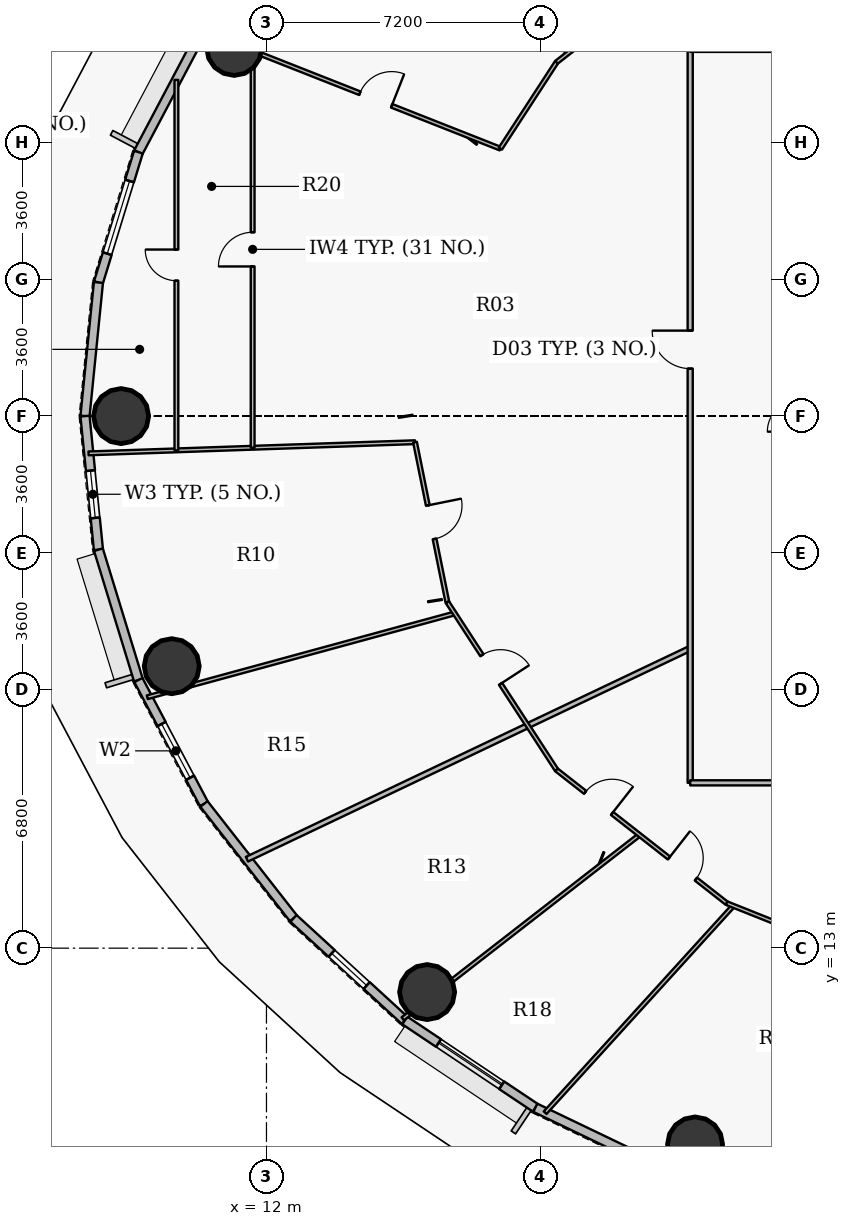
"""IFC4 building model, lengths in metres.
Left out: names, types, materials, properties, quantities, classifications, styles, units other than length and angle.
Written with IfcOpenShell. Run it as: python <this file> out.ifc"""

import sys

from ifc_helpers import new_model, si_unit, direction, frame, frame_2d, origin, origin_2d, place, context, subcontext, project, spatial, rectangle, hollow_circle, extrude, source, transform, mapped, element, fill, save


model = new_model("IFC4")
c1 = context("Model", 3, precision=1e-05, world=origin(), true_north=direction((0.0, 1.0)))
c2 = subcontext(c1, "Body", "Model", "MODEL_VIEW")
j1 = project(units=[si_unit("LENGTHUNIT", "METRE"), si_unit("PLANEANGLEUNIT", "RADIAN")], contexts=[c1])
p1 = place(None, origin())
s1 = spatial("IfcSite", under=j1, at=p1, CompositionType="ELEMENT")
p2 = place(p1, origin())
s2 = spatial("IfcBuilding", under=s1, at=p2, CompositionType="ELEMENT")
p3 = place(p2, frame((0.0, 0.0, 92.4)))
s3 = spatial("IfcBuildingStorey", under=s2, at=p3, CompositionType="ELEMENT", Elevation=92.4)
for number, where, z_axis, x_axis in (
    (1, (11.151, 36.688, -0.3), (0.0, 0.0, 1.0), (1.0, 0.0, 0.0)),
    (2, (8.175, 27.0, -0.3), (0.0, 0.0, 1.0), (1.0, 0.0, 0.0)),
    (3, (9.507, 20.419, -0.3), (0.0, 0.0, 1.0), (1.0, 0.0, 0.0)),
    (4, (16.227, 11.844, -0.3), (0.0, 0.0, 1.0), (1.0, 0.0, 0.0)),
    (5, (23.278, 7.835, -0.3), (0.0, 0.0, 1.0), (1.0, 0.0, 0.0)),
):
    element("IfcColumn", number, at=place(p3, frame(where, z_axis=z_axis, x_axis=x_axis)), inside=s3, PredefinedType="COLUMN", context=c2, shape_type="SweptSolid", body=[
        extrude(hollow_circle(Radius=0.725, WallThickness=0.042, at=origin_2d()), origin(), (0.0, 0.0, 1.0), 5.1),
    ])
p4 = place(p3, frame((8.63, 33.945, 0.0), z_axis=(0.0, 0.0, 1.0), x_axis=(0.467614004126, 0.883932770716, 0.0)))
e6 = element("IfcWall", 6, at=p4, inside=s3, PredefinedType="SOLIDWALL", context=c2, shape_type="SweptSolid", body=[
    extrude(rectangle(XDim=3.689, YDim=0.24, at=frame_2d((1.844, 0.0))), origin(), (0.0, 0.0, 1.0), 4.55),
])
p5 = place(p3, frame((7.578, 30.515, 0.0), z_axis=(0.0, 0.0, 1.0), x_axis=(0.293124431344, 0.956074300329, 0.0)))
e7 = element("IfcWall", 7, at=p5, inside=s3, PredefinedType="SOLIDWALL", context=c2, shape_type="SweptSolid", body=[
    extrude(rectangle(XDim=3.587, YDim=0.24, at=frame_2d((1.793, 0.0))), origin(), (0.0, 0.0, 1.0), 4.55),
])
p6 = place(p5, frame((0.794, 0.0, 0.9)))
e8 = element("IfcOpeningElement", 8, at=p6, cuts=e7, PredefinedType="OPENING", context=c2, shape_type="SweptSolid", body=[
    extrude(rectangle(XDim=2.0, YDim=1.75, at=origin_2d()), frame((1.0, 0.13, 0.875), z_axis=(0.0, -1.0, 0.0), x_axis=(1.0, 0.0, 0.0)), (0.0, 0.0, 1.0), 0.26),
])
p7 = place(p3, frame((7.225, 27.0, 0.0), z_axis=(0.0, 0.0, 1.0), x_axis=(0.099989468229, 0.994988495533, 0.0)))
e9 = element("IfcWall", 9, at=p7, inside=s3, PredefinedType="SOLIDWALL", context=c2, shape_type="SweptSolid", body=[
    extrude(rectangle(XDim=3.533, YDim=0.24, at=frame_2d((1.767, 0.0))), origin(), (0.0, 0.0, 1.0), 4.55),
])
p8 = place(p3, frame((7.578, 23.485, 0.0), z_axis=(0.0, 0.0, 1.0), x_axis=(-0.099989468229, 0.994988495533, 0.0)))
e10 = element("IfcWall", 10, at=p8, inside=s3, PredefinedType="SOLIDWALL", context=c2, shape_type="SweptSolid", body=[
    extrude(rectangle(XDim=3.533, YDim=0.24, at=frame_2d((1.767, 0.0))), origin(), (0.0, 0.0, 1.0), 4.55),
])
p9 = place(p8, frame((0.841, 0.0, 0.9)))
e11 = element("IfcOpeningElement", 11, at=p9, cuts=e10, PredefinedType="OPENING", context=c2, shape_type="SweptSolid", body=[
    extrude(rectangle(XDim=1.25, YDim=1.65, at=origin_2d()), frame((0.625, 0.13, 0.825), z_axis=(0.0, -1.0, 0.0), x_axis=(1.0, 0.0, 0.0)), (0.0, 0.0, 1.0), 0.26),
])
p10 = place(p3, frame((8.63, 20.055, 0.0), z_axis=(0.0, 0.0, 1.0), x_axis=(-0.293124431344, 0.956074300329, 0.0)))
e12 = element("IfcWall", 12, at=p10, inside=s3, PredefinedType="SOLIDWALL", context=c2, shape_type="SweptSolid", body=[
    extrude(rectangle(XDim=3.587, YDim=0.24, at=frame_2d((1.793, 0.0))), origin(), (0.0, 0.0, 1.0), 4.55),
])
p11 = place(p3, frame((10.355, 16.794, 0.0), z_axis=(0.0, 0.0, 1.0), x_axis=(-0.467614004126, 0.883932770716, 0.0)))
e13 = element("IfcWall", 13, at=p11, inside=s3, PredefinedType="SOLIDWALL", context=c2, shape_type="SweptSolid", body=[
    extrude(rectangle(XDim=3.689, YDim=0.24, at=frame_2d((1.844, 0.0))), origin(), (0.0, 0.0, 1.0), 4.55),
])
p12 = place(p11, frame((0.781, 0.0, 0.9)))
e14 = element("IfcOpeningElement", 14, at=p12, cuts=e13, PredefinedType="OPENING", context=c2, shape_type="SweptSolid", body=[
    extrude(rectangle(XDim=1.6, YDim=1.75, at=origin_2d()), frame((0.8, 0.13, 0.875), z_axis=(0.0, -1.0, 0.0), x_axis=(1.0, 0.0, 0.0)), (0.0, 0.0, 1.0), 0.26),
])
p13 = place(p3, frame((12.711, 13.783, 0.0), z_axis=(0.0, 0.0, 1.0), x_axis=(-0.616272103517, 0.787533297345, 0.0)))
e15 = element("IfcWall", 15, at=p13, inside=s3, PredefinedType="SOLIDWALL", context=c2, shape_type="SweptSolid", body=[
    extrude(rectangle(XDim=3.823, YDim=0.24, at=frame_2d((1.912, 0.0))), origin(), (0.0, 0.0, 1.0), 4.55),
])
p14 = place(p3, frame((15.642, 11.097, 0.0), z_axis=(0.0, 0.0, 1.0), x_axis=(-0.737113356241, 0.675769117414, 0.0)))
e16 = element("IfcWall", 16, at=p14, inside=s3, PredefinedType="SOLIDWALL", context=c2, shape_type="SweptSolid", body=[
    extrude(rectangle(XDim=3.976, YDim=0.24, at=frame_2d((1.988, 0.0))), origin(), (0.0, 0.0, 1.0), 4.55),
])
p15 = place(p14, frame((1.363, 0.0, 0.9)))
e17 = element("IfcOpeningElement", 17, at=p15, cuts=e16, PredefinedType="OPENING", context=c2, shape_type="SweptSolid", body=[
    extrude(rectangle(XDim=1.25, YDim=1.65, at=origin_2d()), frame((0.625, 0.13, 0.825), z_axis=(0.0, -1.0, 0.0), x_axis=(1.0, 0.0, 0.0)), (0.0, 0.0, 1.0), 0.26),
])
p16 = place(p3, frame((19.075, 8.801, 0.0), z_axis=(0.0, 0.0, 1.0), x_axis=(-0.831221811447, 0.555940914284, 0.0)))
e18 = element("IfcWall", 18, at=p16, inside=s3, PredefinedType="SOLIDWALL", context=c2, shape_type="SweptSolid", body=[
    extrude(rectangle(XDim=4.13, YDim=0.24, at=frame_2d((2.065, 0.0))), origin(), (0.0, 0.0, 1.0), 4.55),
])
p17 = place(p16, frame((1.065, 0.0, 0.9)))
e19 = element("IfcOpeningElement", 19, at=p17, cuts=e18, PredefinedType="OPENING", context=c2, shape_type="SweptSolid", body=[
    extrude(rectangle(XDim=2.0, YDim=1.75, at=origin_2d()), frame((1.0, 0.13, 0.875), z_axis=(0.0, -1.0, 0.0), x_axis=(1.0, 0.0, 0.0)), (0.0, 0.0, 1.0), 0.26),
])
p18 = place(p3, frame((22.926, 6.953, 0.0), z_axis=(0.0, 0.0, 1.0), x_axis=(-0.901589935876, 0.432591709962, 0.0)))
e20 = element("IfcWall", 20, at=p18, inside=s3, PredefinedType="SOLIDWALL", context=c2, shape_type="SweptSolid", body=[
    extrude(rectangle(XDim=4.272, YDim=0.24, at=frame_2d((2.136, 0.0))), origin(), (0.0, 0.0, 1.0), 4.55),
])
p19 = place(p3, frame((7.319, 26.019, 0.0), z_axis=(0.0, 0.0, 1.0), x_axis=(0.999416042933, 0.034169769216, 0.0)))
e21 = element("IfcWall", 21, at=p19, inside=s3, PredefinedType="PARTITIONING", context=c2, shape_type="SweptSolid", body=[
    extrude(rectangle(XDim=8.595, YDim=0.1, at=frame_2d((4.298, 0.0))), origin(), (0.0, 0.0, 1.0), 3.985),
])
p20 = place(p3, frame((8.864, 19.602, 0.0), z_axis=(0.0, 0.0, 1.0), x_axis=(0.964794050911, 0.263006538565, 0.0)))
e22 = element("IfcWall", 22, at=p20, inside=s3, PredefinedType="PARTITIONING", context=c2, shape_type="SweptSolid", body=[
    extrude(rectangle(XDim=8.385, YDim=0.1, at=frame_2d((4.192, 0.0))), origin(), (0.0, 0.0, 1.0), 3.985),
])
p21 = place(p3, frame((9.63, 26.098, 0.0), z_axis=(0.0, 0.0, 1.0), x_axis=(0.0, 1.0, 0.0)))
e23 = element("IfcWall", 23, at=p21, inside=s3, PredefinedType="PARTITIONING", context=c2, shape_type="SweptSolid", body=[
    extrude(rectangle(XDim=9.748, YDim=0.1, at=frame_2d((4.874, 0.0))), origin(), (0.0, 0.0, 1.0), 3.985),
])
p22 = place(p21, frame((4.464, 0.0, 0.0)))
e24 = element("IfcOpeningElement", 24, at=p22, cuts=e23, PredefinedType="OPENING", context=c2, shape_type="SweptSolid", body=[
    extrude(rectangle(XDim=0.82, YDim=2.1, at=origin_2d()), frame((0.41, 0.06, 1.05), z_axis=(0.0, -1.0, 0.0), x_axis=(1.0, 0.0, 0.0)), (0.0, 0.0, 1.0), 0.12),
])
p23 = place(p3, frame((10.309, 37.131, 0.0), z_axis=(0.0, 0.0, 1.0), x_axis=(0.930286568853, -0.366833613251, 0.0)))
e25 = element("IfcWall", 25, at=p23, inside=s3, PredefinedType="PARTITIONING", context=c2, shape_type="SweptSolid", body=[
    extrude(rectangle(XDim=8.432, YDim=0.1, at=frame_2d((4.216, 0.0))), origin(), (0.0, 0.0, 1.0), 3.985),
])
p24 = place(p23, frame((4.459, 0.0, 0.0)))
e26 = element("IfcOpeningElement", 26, at=p24, cuts=e25, PredefinedType="OPENING", context=c2, shape_type="SweptSolid", body=[
    extrude(rectangle(XDim=0.9, YDim=2.1, at=origin_2d()), frame((0.45, 0.06, 1.05), z_axis=(0.0, -1.0, 0.0), x_axis=(1.0, 0.0, 0.0)), (0.0, 0.0, 1.0), 0.12),
])
p25 = place(p3, frame((11.486, 15.34, 0.0), z_axis=(0.0, 0.0, 1.0), x_axis=(0.903055043221, 0.429524840857, 0.0)))
e27 = element("IfcWall", 27, at=p25, inside=s3, PredefinedType="PARTITIONING", context=c2, shape_type="SweptSolid", body=[
    extrude(rectangle(XDim=12.916, YDim=0.135, at=frame_2d((6.458, 0.0))), origin(), (0.0, 0.0, 1.0), 3.985),
])
p26 = place(p3, frame((11.636, 26.167, 0.0), z_axis=(0.0, 0.0, 1.0), x_axis=(0.0, 1.0, 0.0)))
e28 = element("IfcWall", 28, at=p26, inside=s3, PredefinedType="PARTITIONING", context=c2, shape_type="SweptSolid", body=[
    extrude(rectangle(XDim=10.44, YDim=0.1, at=frame_2d((5.22, 0.0))), origin(), (0.0, 0.0, 1.0), 3.985),
])
p27 = place(p26, frame((4.77, 0.0, 0.0)))
e29 = element("IfcOpeningElement", 29, at=p27, cuts=e28, PredefinedType="OPENING", context=c2, shape_type="SweptSolid", body=[
    extrude(rectangle(XDim=0.9, YDim=2.1, at=origin_2d()), frame((0.45, 0.06, 1.05), z_axis=(0.0, -1.0, 0.0), x_axis=(1.0, 0.0, 0.0)), (0.0, 0.0, 1.0), 0.12),
])
p28 = place(p3, frame((13.159, 40.634, 0.0), z_axis=(0.0, 0.0, 1.0), x_axis=(0.858651150201, -0.512560437664, 0.0)))
e30 = element("IfcWall", 30, at=p28, inside=s3, PredefinedType="PARTITIONING", context=c2, shape_type="SweptSolid", body=[
    extrude(rectangle(XDim=7.927, YDim=0.1, at=frame_2d((3.963, 0.0))), origin(), (0.0, 0.0, 1.0), 3.985),
])
p29 = place(p3, frame((15.586, 11.141, 0.0), z_axis=(0.0, 0.0, 1.0), x_axis=(0.789708718244, 0.613481980445, 0.0)))
e31 = element("IfcWall", 31, at=p29, inside=s3, PredefinedType="PARTITIONING", context=c2, shape_type="SweptSolid", body=[
    extrude(rectangle(XDim=7.888, YDim=0.1, at=frame_2d((3.944, 0.0))), origin(), (0.0, 0.0, 1.0), 3.985),
])
p30 = place(p3, frame((15.909, 26.313, 0.0), z_axis=(0.0, 0.0, 1.0), x_axis=(0.198237240658, -0.980154067694, 0.0)))
e32 = element("IfcWall", 32, at=p30, inside=s3, PredefinedType="PARTITIONING", context=c2, shape_type="SweptSolid", body=[
    extrude(rectangle(XDim=4.293, YDim=0.1, at=frame_2d((2.146, 0.0))), origin(), (0.0, 0.0, 1.0), 3.985),
])
p31 = place(p30, frame((1.697, 0.0, 0.0)))
e33 = element("IfcOpeningElement", 33, at=p31, cuts=e32, PredefinedType="OPENING", context=c2, shape_type="SweptSolid", body=[
    extrude(rectangle(XDim=0.9, YDim=2.1, at=origin_2d()), frame((0.45, 0.06, 1.05), z_axis=(0.0, -1.0, 0.0), x_axis=(1.0, 0.0, 0.0)), (0.0, 0.0, 1.0), 0.12),
])
p32 = place(p3, frame((16.76, 22.105, 0.0), z_axis=(0.0, 0.0, 1.0), x_axis=(0.545405249109, -0.838172484781, 0.0)))
e34 = element("IfcWall", 34, at=p32, inside=s3, PredefinedType="PARTITIONING", context=c2, shape_type="SweptSolid", body=[
    extrude(rectangle(XDim=5.269, YDim=0.1, at=frame_2d((2.634, 0.0))), origin(), (0.0, 0.0, 1.0), 3.985),
])
p33 = place(p32, frame((1.666, 0.0, 0.0)))
e35 = element("IfcOpeningElement", 35, at=p33, cuts=e34, PredefinedType="OPENING", context=c2, shape_type="SweptSolid", body=[
    extrude(rectangle(XDim=0.9, YDim=2.1, at=origin_2d()), frame((0.45, 0.06, 1.05), z_axis=(0.0, -1.0, 0.0), x_axis=(1.0, 0.0, 0.0)), (0.0, 0.0, 1.0), 0.12),
])
p34 = place(p3, frame((18.154, 34.037, 0.0), z_axis=(0.0, 0.0, 1.0), x_axis=(0.545361556746, 0.838200914115, 0.0)))
e36 = element("IfcWall", 36, at=p34, inside=s3, PredefinedType="PARTITIONING", context=c2, shape_type="SweptSolid", body=[
    extrude(rectangle(XDim=2.713, YDim=0.1, at=frame_2d((1.356, 0.0))), origin(), (0.0, 0.0, 1.0), 3.985),
])
p35 = place(p3, frame((19.333, 8.671, 0.0), z_axis=(0.0, 0.0, 1.0), x_axis=(0.672765273406, 0.739855990649, 0.0)))
e37 = element("IfcWall", 37, at=p35, inside=s3, PredefinedType="PARTITIONING", context=c2, shape_type="SweptSolid", body=[
    extrude(rectangle(XDim=7.358, YDim=0.1, at=frame_2d((3.679, 0.0))), origin(), (0.0, 0.0, 1.0), 3.985),
])
p36 = place(p3, frame((19.634, 17.689, 0.0), z_axis=(0.0, 0.0, 1.0), x_axis=(0.787333679705, -0.616527109544, 0.0)))
e38 = element("IfcWall", 38, at=p36, inside=s3, PredefinedType="PARTITIONING", context=c2, shape_type="SweptSolid", body=[
    extrude(rectangle(XDim=5.685, YDim=0.1, at=frame_2d((2.842, 0.0))), origin(), (0.0, 0.0, 1.0), 3.985),
])
p37 = place(p36, frame((0.956, 0.0, 0.0)))
e39 = element("IfcOpeningElement", 39, at=p37, cuts=e38, PredefinedType="OPENING", context=c2, shape_type="SweptSolid", body=[
    extrude(rectangle(XDim=0.9, YDim=2.1, at=origin_2d()), frame((0.45, 0.06, 1.05), z_axis=(0.0, -1.0, 0.0), x_axis=(1.0, 0.0, 0.0)), (0.0, 0.0, 1.0), 0.12),
])
p38 = place(p36, frame((3.758, 0.0, 0.0)))
e40 = element("IfcOpeningElement", 40, at=p38, cuts=e38, PredefinedType="OPENING", context=c2, shape_type="SweptSolid", body=[
    extrude(rectangle(XDim=0.9, YDim=2.1, at=origin_2d()), frame((0.45, 0.06, 1.05), z_axis=(0.0, -1.0, 0.0), x_axis=(1.0, 0.0, 0.0)), (0.0, 0.0, 1.0), 0.12),
])
p39 = place(p3, frame((19.634, 36.311, 0.0), z_axis=(0.0, 0.0, 1.0), x_axis=(0.787333773608, 0.616526989625, 0.0)))
e41 = element("IfcWall", 41, at=p39, inside=s3, PredefinedType="PARTITIONING", context=c2, shape_type="SweptSolid", body=[
    extrude(rectangle(XDim=5.026, YDim=0.1, at=frame_2d((2.513, 0.0))), origin(), (0.0, 0.0, 1.0), 3.985),
])
p40 = place(p39, frame((2.254, 0.0, 0.0)))
e42 = element("IfcOpeningElement", 42, at=p40, cuts=e41, PredefinedType="OPENING", context=c2, shape_type="SweptSolid", body=[
    extrude(rectangle(XDim=0.9, YDim=2.1, at=origin_2d()), frame((0.45, 0.06, 1.05), z_axis=(0.0, -1.0, 0.0), x_axis=(1.0, 0.0, 0.0)), (0.0, 0.0, 1.0), 0.12),
])
p41 = place(p3, frame((23.15, 17.35, 0.0), z_axis=(0.0, 0.0, 1.0), x_axis=(0.0, 1.0, 0.0)))
e43 = element("IfcWall", 43, at=p41, inside=s3, PredefinedType="PARTITIONING", context=c2, shape_type="SweptSolid", body=[
    extrude(rectangle(XDim=19.3, YDim=0.135, at=frame_2d((9.65, 0.0))), origin(), (0.0, 0.0, 1.0), 3.985),
])
p42 = place(p41, frame((10.899, 0.0, 0.0)))
e44 = element("IfcOpeningElement", 44, at=p42, cuts=e43, PredefinedType="OPENING", context=c2, shape_type="SweptSolid", body=[
    extrude(rectangle(XDim=1.0, YDim=2.15, at=origin_2d()), frame((0.5, 0.078, 1.075), z_axis=(0.0, -1.0, 0.0), x_axis=(1.0, 0.0, 0.0)), (0.0, 0.0, 1.0), 0.155),
])
p43 = place(p3, frame((23.15, 17.35, 0.0), z_axis=(0.0, 0.0, 1.0), x_axis=(1.0, 0.0, 0.0)))
e45 = element("IfcWall", 45, at=p43, inside=s3, PredefinedType="PARTITIONING", context=c2, shape_type="SweptSolid", body=[
    extrude(rectangle(XDim=13.235, YDim=0.135, at=frame_2d((6.617, 0.0))), origin(), (0.0, 0.0, 1.0), 3.985),
])
p44 = place(p43, frame((6.117, 0.0, 0.0)))
e46 = element("IfcOpeningElement", 46, at=p44, cuts=e45, PredefinedType="OPENING", context=c2, shape_type="SweptSolid", body=[
    extrude(rectangle(XDim=1.0, YDim=2.15, at=origin_2d()), frame((0.5, 0.078, 1.075), z_axis=(0.0, -1.0, 0.0), x_axis=(1.0, 0.0, 0.0)), (0.0, 0.0, 1.0), 0.155),
])
p45 = place(p3, frame((24.109, 14.184, 0.0), z_axis=(0.0, 0.0, 1.0), x_axis=(0.928803554156, -0.370572473055, 0.0)))
e47 = element("IfcWall", 47, at=p45, inside=s3, PredefinedType="PARTITIONING", context=c2, shape_type="SweptSolid", body=[
    extrude(rectangle(XDim=6.072, YDim=0.1, at=frame_2d((3.036, 0.0))), origin(), (0.0, 0.0, 1.0), 3.985),
])
m1 = source(origin(), c2, "Body", "SweptSolid", [
    extrude(rectangle(XDim=2.0, YDim=1.75, at=origin_2d()), frame((1.0, 0.03, 0.875), z_axis=(0.0, -1.0, 0.0), x_axis=(1.0, 0.0, 0.0)), (0.0, 0.0, 1.0), 0.06),
])
p46 = place(p6, origin())
e48 = element("IfcWindow", 48, at=p46, inside=s3, PartitioningType="DOUBLE_PANEL_VERTICAL", PredefinedType="WINDOW", context=c2, shape_type="MappedRepresentation", body=[
    mapped(m1, transform((0.0, 0.0, 0.0), x_axis=(1.0, 0.0, 0.0), y_axis=(0.0, 1.0, 0.0), z_axis=(0.0, 0.0, 1.0), scale=1.0)),
])
fill(e8, e48)
m2 = source(origin(), c2, "Body", "SweptSolid", [
    extrude(rectangle(XDim=1.25, YDim=1.65, at=origin_2d()), frame((0.625, 0.03, 0.825), z_axis=(0.0, -1.0, 0.0), x_axis=(1.0, 0.0, 0.0)), (0.0, 0.0, 1.0), 0.06),
])
p47 = place(p9, origin())
e49 = element("IfcWindow", 49, at=p47, inside=s3, PartitioningType="SINGLE_PANEL", PredefinedType="WINDOW", context=c2, shape_type="MappedRepresentation", body=[
    mapped(m2, transform((0.0, 0.0, 0.0), x_axis=(1.0, 0.0, 0.0), y_axis=(0.0, 1.0, 0.0), z_axis=(0.0, 0.0, 1.0), scale=1.0)),
])
fill(e11, e49)
m3 = source(origin(), c2, "Body", "SweptSolid", [
    extrude(rectangle(XDim=1.6, YDim=1.75, at=origin_2d()), frame((0.8, 0.03, 0.875), z_axis=(0.0, -1.0, 0.0), x_axis=(1.0, 0.0, 0.0)), (0.0, 0.0, 1.0), 0.06),
])
p48 = place(p12, origin())
e50 = element("IfcWindow", 50, at=p48, inside=s3, PartitioningType="DOUBLE_PANEL_VERTICAL", PredefinedType="WINDOW", context=c2, shape_type="MappedRepresentation", body=[
    mapped(m3, transform((0.0, 0.0, 0.0), x_axis=(1.0, 0.0, 0.0), y_axis=(0.0, 1.0, 0.0), z_axis=(0.0, 0.0, 1.0), scale=1.0)),
])
fill(e14, e50)
p49 = place(p17, origin())
e51 = element("IfcWindow", 51, at=p49, inside=s3, PartitioningType="DOUBLE_PANEL_VERTICAL", PredefinedType="WINDOW", context=c2, shape_type="MappedRepresentation", body=[
    mapped(m1, transform((0.0, 0.0, 0.0), x_axis=(1.0, 0.0, 0.0), y_axis=(0.0, 1.0, 0.0), z_axis=(0.0, 0.0, 1.0), scale=1.0)),
])
fill(e19, e51)
p50 = place(p15, origin())
e52 = element("IfcWindow", 52, at=p50, inside=s3, PartitioningType="SINGLE_PANEL", PredefinedType="WINDOW", context=c2, shape_type="MappedRepresentation", body=[
    mapped(m2, transform((0.0, 0.0, 0.0), x_axis=(1.0, 0.0, 0.0), y_axis=(0.0, 1.0, 0.0), z_axis=(0.0, 0.0, 1.0), scale=1.0)),
])
fill(e17, e52)
m4 = source(origin(), c2, "Body", "SweptSolid", [
    extrude(rectangle(XDim=1.0, YDim=2.15, at=origin_2d()), frame((0.5, 0.025, 1.075), z_axis=(0.0, -1.0, 0.0), x_axis=(1.0, 0.0, 0.0)), (0.0, 0.0, 1.0), 0.05),
])
p51 = place(p42, origin())
e53 = element("IfcDoor", 53, at=p51, inside=s3, OperationType="SINGLE_SWING_RIGHT", PredefinedType="DOOR", context=c2, shape_type="MappedRepresentation", body=[
    mapped(m4, transform((0.0, 0.0, 0.0), x_axis=(1.0, 0.0, 0.0), y_axis=(0.0, 1.0, 0.0), z_axis=(0.0, 0.0, 1.0), scale=1.0)),
])
fill(e44, e53)
m5 = source(origin(), c2, "Body", "SweptSolid", [
    extrude(rectangle(XDim=0.9, YDim=2.1, at=origin_2d()), frame((0.45, 0.025, 1.05), z_axis=(0.0, -1.0, 0.0), x_axis=(1.0, 0.0, 0.0)), (0.0, 0.0, 1.0), 0.05),
])
p52 = place(p24, origin())
e54 = element("IfcDoor", 54, at=p52, inside=s3, OperationType="SINGLE_SWING_RIGHT", PredefinedType="DOOR", context=c2, shape_type="MappedRepresentation", body=[
    mapped(m5, transform((0.0, 0.0, 0.0), x_axis=(1.0, 0.0, 0.0), y_axis=(0.0, 1.0, 0.0), z_axis=(0.0, 0.0, 1.0), scale=1.0)),
])
fill(e26, e54)
p53 = place(p31, origin())
e55 = element("IfcDoor", 55, at=p53, inside=s3, OperationType="SINGLE_SWING_LEFT", PredefinedType="DOOR", context=c2, shape_type="MappedRepresentation", body=[
    mapped(m5, transform((0.0, 0.0, 0.0), x_axis=(1.0, 0.0, 0.0), y_axis=(0.0, 1.0, 0.0), z_axis=(0.0, 0.0, 1.0), scale=1.0)),
])
fill(e33, e55)
p54 = place(p33, origin())
e56 = element("IfcDoor", 56, at=p54, inside=s3, OperationType="SINGLE_SWING_RIGHT", PredefinedType="DOOR", context=c2, shape_type="MappedRepresentation", body=[
    mapped(m5, transform((0.0, 0.0, 0.0), x_axis=(1.0, 0.0, 0.0), y_axis=(0.0, 1.0, 0.0), z_axis=(0.0, 0.0, 1.0), scale=1.0)),
])
fill(e35, e56)
p55 = place(p27, origin())
e57 = element("IfcDoor", 57, at=p55, inside=s3, OperationType="SINGLE_SWING_LEFT", PredefinedType="DOOR", context=c2, shape_type="MappedRepresentation", body=[
    mapped(m5, transform((0.0, 0.0, 0.0), x_axis=(1.0, 0.0, 0.0), y_axis=(0.0, 1.0, 0.0), z_axis=(0.0, 0.0, 1.0), scale=1.0)),
])
fill(e29, e57)
m6 = source(origin(), c2, "Body", "SweptSolid", [
    extrude(rectangle(XDim=0.82, YDim=2.1, at=origin_2d()), frame((0.41, 0.025, 1.05), z_axis=(0.0, -1.0, 0.0), x_axis=(1.0, 0.0, 0.0)), (0.0, 0.0, 1.0), 0.05),
])
p56 = place(p22, origin())
e58 = element("IfcDoor", 58, at=p56, inside=s3, OperationType="SINGLE_SWING_RIGHT", PredefinedType="DOOR", context=c2, shape_type="MappedRepresentation", body=[
    mapped(m6, transform((0.0, 0.0, 0.0), x_axis=(1.0, 0.0, 0.0), y_axis=(0.0, 1.0, 0.0), z_axis=(0.0, 0.0, 1.0), scale=1.0)),
])
fill(e24, e58)
p57 = place(p37, origin())
e59 = element("IfcDoor", 59, at=p57, inside=s3, OperationType="SINGLE_SWING_RIGHT", PredefinedType="DOOR", context=c2, shape_type="MappedRepresentation", body=[
    mapped(m5, transform((0.0, 0.0, 0.0), x_axis=(1.0, 0.0, 0.0), y_axis=(0.0, 1.0, 0.0), z_axis=(0.0, 0.0, 1.0), scale=1.0)),
])
fill(e39, e59)
p58 = place(p38, origin())
e60 = element("IfcDoor", 60, at=p58, inside=s3, OperationType="SINGLE_SWING_LEFT", PredefinedType="DOOR", context=c2, shape_type="MappedRepresentation", body=[
    mapped(m5, transform((0.0, 0.0, 0.0), x_axis=(1.0, 0.0, 0.0), y_axis=(0.0, 1.0, 0.0), z_axis=(0.0, 0.0, 1.0), scale=1.0)),
])
fill(e40, e60)
save(model, sys.argv[1])
